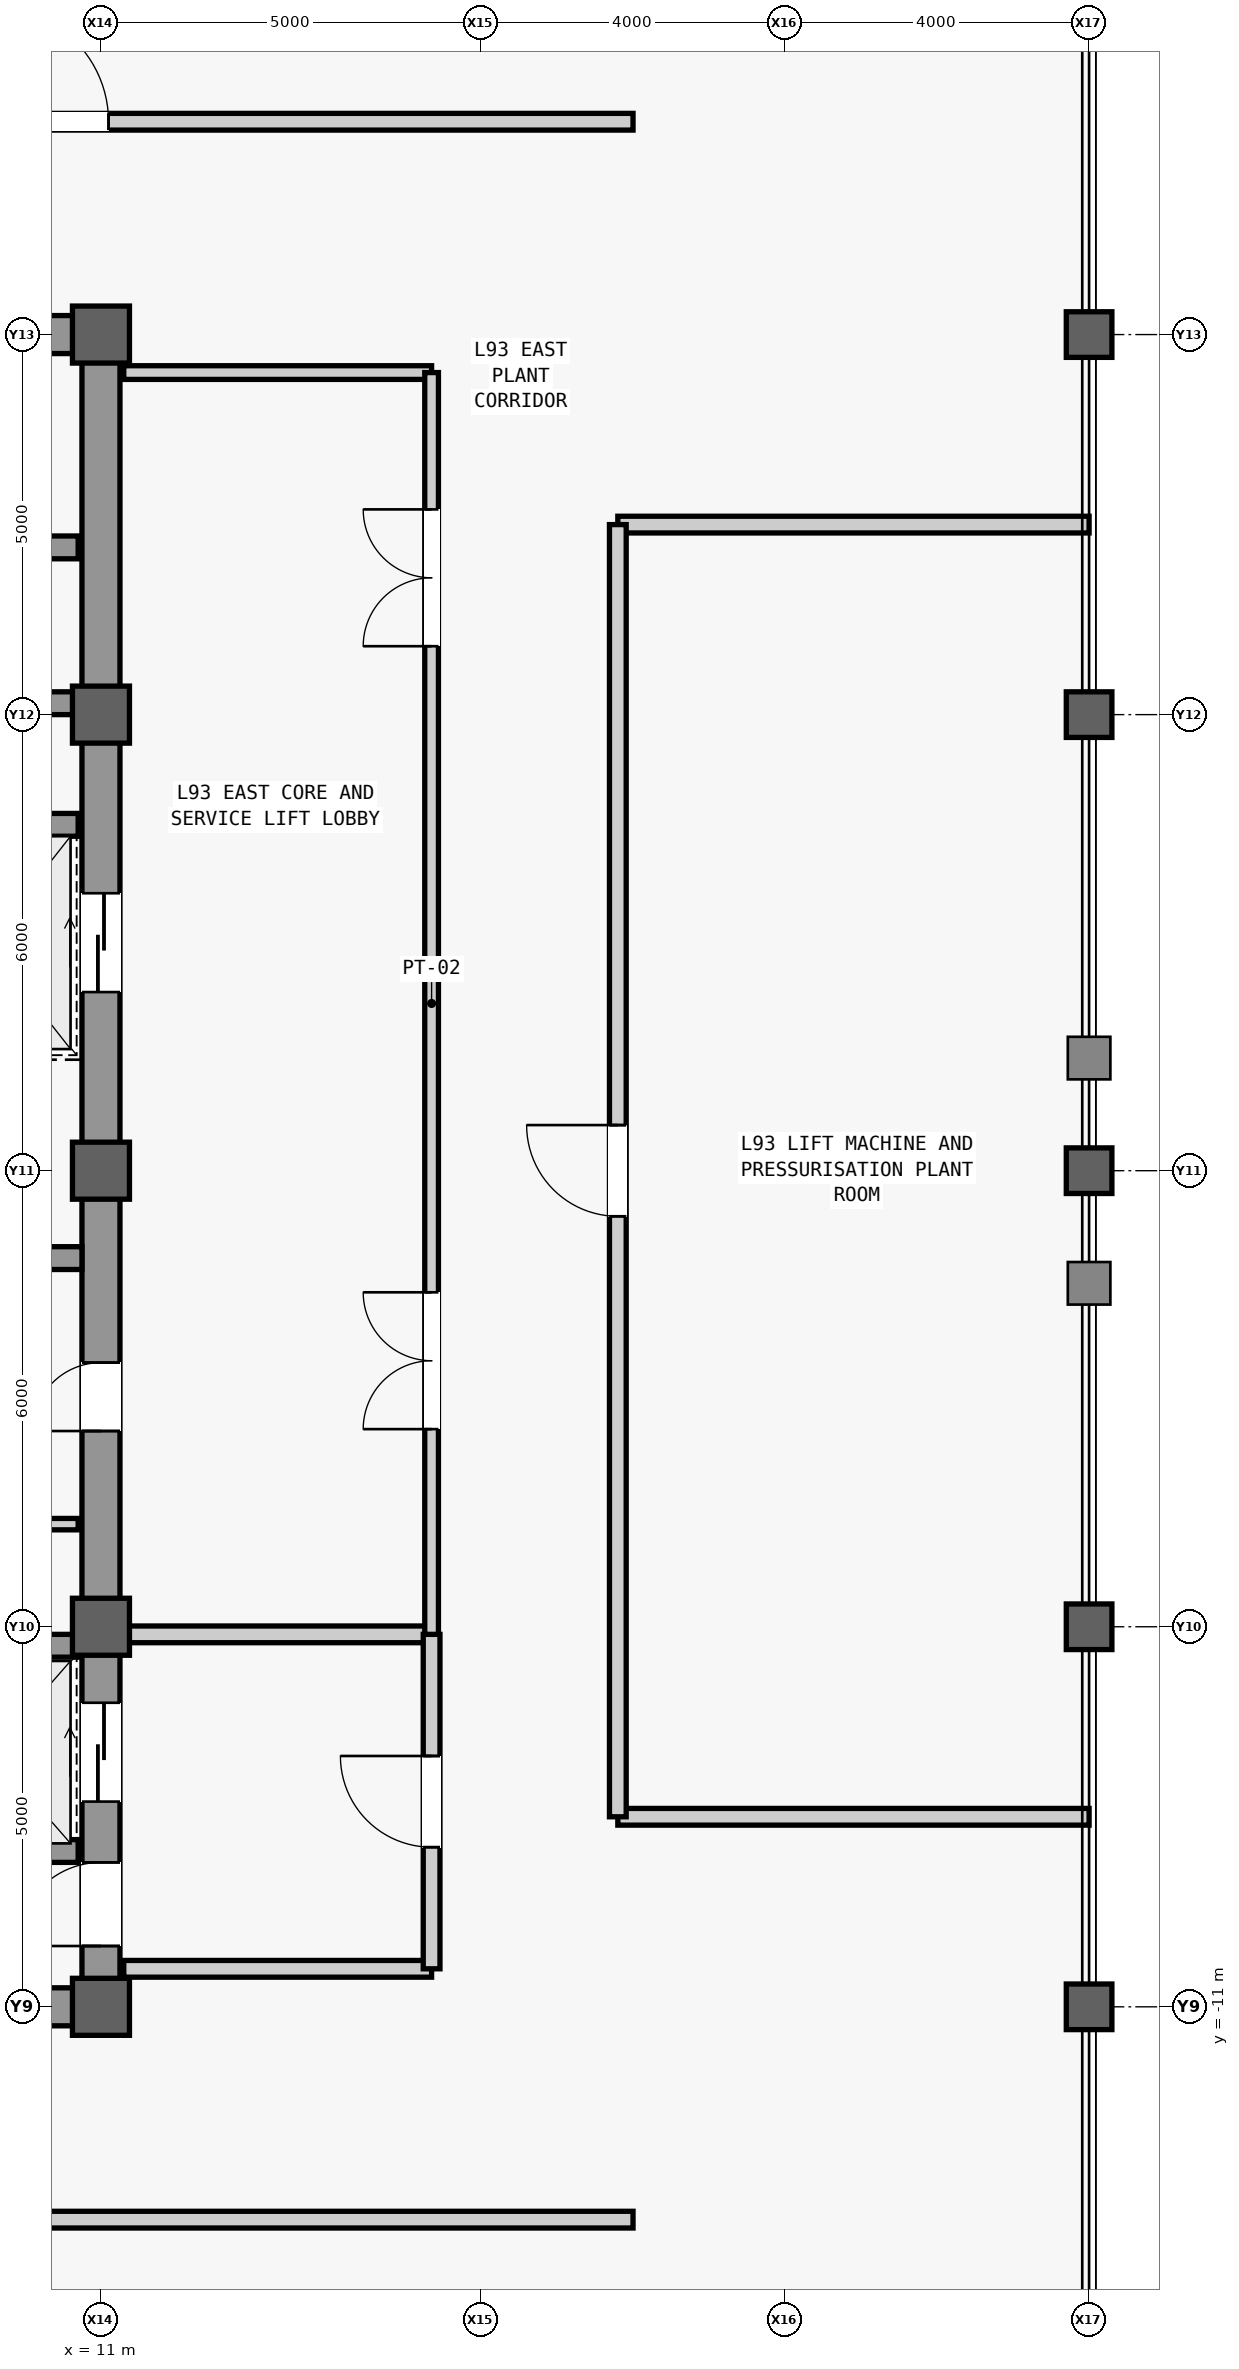
"""IFC4 building model, lengths in metres.
Left out: names, types, materials, properties, quantities, classifications, styles, units other than length and angle.
Written with IfcOpenShell. Run it as: python <this file> out.ifc"""

import sys

from ifc_helpers import new_model, si_unit, direction, frame, frame_2d, origin, origin_2d, place, context, subcontext, project, spatial, rectangle, hollow_rectangle, extrude, source, transform, mapped, element, fill, save


model = new_model("IFC4")
c1 = context("Model", 3, precision=1e-05, world=origin(), true_north=direction((0.0, 1.0)))
c2 = subcontext(c1, "Body", "Model", "MODEL_VIEW")
j1 = project(units=[si_unit("LENGTHUNIT", "METRE"), si_unit("PLANEANGLEUNIT", "RADIAN")], contexts=[c1])
p1 = place(None, origin())
s1 = spatial("IfcSite", under=j1, at=p1, CompositionType="ELEMENT")
p2 = place(p1, origin())
s2 = spatial("IfcBuilding", under=s1, at=p2, CompositionType="ELEMENT")
p3 = place(p2, frame((0.0, 0.0, 394.7)))
s3 = spatial("IfcBuildingStorey", under=s2, at=p3, CompositionType="ELEMENT", Elevation=394.7)
m1 = source(origin(), c2, "Body", "SweptSolid", [
    extrude(rectangle(XDim=22.0, YDim=0.5, at=frame_2d((11.0, 0.0))), origin(), (0.0, 0.0, 1.0), 4.45),
])
p4 = place(p3, frame((11.0, -11.0, 0.0), z_axis=(0.0, 0.0, 1.0), x_axis=(0.0, 1.0, 0.0)))
e1 = element("IfcWall", 1, at=p4, inside=s3, PredefinedType="SHEAR", context=c2, shape_type="MappedRepresentation", body=[
    mapped(m1, transform((0.0, 0.0, 0.0), scale=1.0)),
])
m2 = source(origin(), c2, "Body", "SweptSolid", [
    extrude(rectangle(XDim=1.1, YDim=2.2, at=frame_2d((0.55, 1.1))), frame((0.0, 0.26, 0.0), z_axis=(0.0, -1.0, 0.0), x_axis=(1.0, 0.0, 0.0)), (0.0, 0.0, 1.0), 0.52),
])
p5 = place(p4, frame((0.8, 0.0, 0.0)))
e2 = element("IfcOpeningElement", 2, at=p5, cuts=e1, PredefinedType="OPENING", context=c2, shape_type="MappedRepresentation", body=[
    mapped(m2, transform((0.0, 0.0, 0.0), scale=1.0)),
])
m3 = source(origin(), c2, "Body", "SweptSolid", [
    extrude(rectangle(XDim=0.9, YDim=2.15, at=frame_2d((0.45, 1.075))), frame((0.0, 0.26, 0.0), z_axis=(0.0, -1.0, 0.0), x_axis=(1.0, 0.0, 0.0)), (0.0, 0.0, 1.0), 0.52),
])
p6 = place(p4, frame((7.575, 0.0, 0.0)))
e3 = element("IfcOpeningElement", 3, at=p6, cuts=e1, PredefinedType="OPENING", context=c2, shape_type="MappedRepresentation", body=[
    mapped(m3, transform((0.0, 0.0, 0.0), scale=1.0)),
])
m4 = source(origin(), c2, "Body", "SweptSolid", [
    extrude(rectangle(XDim=1.3, YDim=2.3, at=frame_2d((0.65, 1.15))), frame((0.0, 0.26, 0.0), z_axis=(0.0, -1.0, 0.0), x_axis=(1.0, 0.0, 0.0)), (0.0, 0.0, 1.0), 0.52),
])
p7 = place(p4, frame((2.7, 0.0, 0.0)))
e4 = element("IfcOpeningElement", 4, at=p7, cuts=e1, PredefinedType="OPENING", context=c2, shape_type="MappedRepresentation", body=[
    mapped(m4, transform((0.0, 0.0, 0.0), scale=1.0)),
])
p8 = place(p4, frame((13.35, 0.0, 0.0)))
e5 = element("IfcOpeningElement", 5, at=p8, cuts=e1, PredefinedType="OPENING", context=c2, shape_type="MappedRepresentation", body=[
    mapped(m4, transform((0.0, 0.0, 0.0), scale=1.0)),
])
m5 = source(origin(), c2, "Body", "SweptSolid", [
    extrude(rectangle(XDim=5.9, YDim=0.5, at=frame_2d((2.95, 0.0))), origin(), (0.0, 0.0, 1.0), 4.45),
])
p9 = place(p3, frame((4.85, -11.0, 0.0), z_axis=(0.0, 0.0, 1.0), x_axis=(1.0, 0.0, 0.0)))
e6 = element("IfcWall", 6, at=p9, inside=s3, PredefinedType="SHEAR", context=c2, shape_type="MappedRepresentation", body=[
    mapped(m5, transform((0.0, 0.0, 0.0), scale=1.0)),
])
p10 = place(p3, frame((4.85, 11.0, 0.0), z_axis=(0.0, 0.0, 1.0), x_axis=(1.0, 0.0, 0.0)))
e7 = element("IfcWall", 7, at=p10, inside=s3, PredefinedType="SHEAR", context=c2, shape_type="MappedRepresentation", body=[
    mapped(m5, transform((0.0, 0.0, 0.0), scale=1.0)),
])
p11 = place(p10, frame((0.5, 0.0, 0.0)))
e8 = element("IfcOpeningElement", 8, at=p11, cuts=e7, PredefinedType="OPENING", context=c2, shape_type="MappedRepresentation", body=[
    mapped(m3, transform((0.0, 0.0, 0.0), scale=1.0)),
])
m6 = source(origin(), c2, "Body", "SweptSolid", [
    extrude(rectangle(XDim=5.65, YDim=0.3, at=frame_2d((2.825, 0.0))), origin(), (0.0, 0.0, 1.0), 4.45),
])
p12 = place(p3, frame((5.1, -1.15, 0.0), z_axis=(0.0, 0.0, 1.0), x_axis=(1.0, 0.0, 0.0)))
e9 = element("IfcWall", 9, at=p12, inside=s3, PredefinedType="SHEAR", context=c2, shape_type="MappedRepresentation", body=[
    mapped(m6, transform((0.0, 0.0, 0.0), scale=1.0)),
])
m7 = source(origin(), c2, "Body", "SweptSolid", [
    extrude(rectangle(XDim=0.75, YDim=0.75, at=origin_2d()), origin(), (0.0, 0.0, 1.0), 4.8),
])
for number, where, z_axis, x_axis in (
    (10, (11.0, -11.0, 0.0), (0.0, 0.0, 1.0), (1.0, 0.0, 0.0)),
    (11, (11.0, -6.0, 0.0), (0.0, 0.0, 1.0), (1.0, 0.0, 0.0)),
    (12, (11.0, 0.0, 0.0), (0.0, 0.0, 1.0), (1.0, 0.0, 0.0)),
    (13, (11.0, 6.0, 0.0), (0.0, 0.0, 1.0), (1.0, 0.0, 0.0)),
    (14, (11.0, 11.0, 0.0), (0.0, 0.0, 1.0), (1.0, 0.0, 0.0)),
):
    element("IfcColumn", number, at=place(p3, frame(where, z_axis=z_axis, x_axis=x_axis)), inside=s3, PredefinedType="COLUMN", context=c2, shape_type="MappedRepresentation", body=[
        mapped(m7, transform((0.0, 0.0, 0.0), scale=1.0)),
    ])
m8 = source(origin(), c2, "Body", "SweptSolid", [
    extrude(hollow_rectangle(XDim=0.6, YDim=0.6, WallThickness=0.035, at=origin_2d()), origin(), (0.0, 0.0, 1.0), 4.8),
])
for number, where, z_axis, x_axis in (
    (15, (24.0, -11.0, 0.0), (0.0, 0.0, 1.0), (1.0, 0.0, 0.0)),
    (16, (24.0, -6.0, 0.0), (0.0, 0.0, 1.0), (1.0, 0.0, 0.0)),
    (17, (24.0, 0.0, 0.0), (0.0, 0.0, 1.0), (1.0, 0.0, 0.0)),
    (18, (24.0, 6.0, 0.0), (0.0, 0.0, 1.0), (1.0, 0.0, 0.0)),
    (19, (24.0, 11.0, 0.0), (0.0, 0.0, 1.0), (1.0, 0.0, 0.0)),
):
    element("IfcColumn", number, at=place(p3, frame(where, z_axis=z_axis, x_axis=x_axis)), inside=s3, PredefinedType="COLUMN", context=c2, shape_type="MappedRepresentation", body=[
        mapped(m8, transform((0.0, 0.0, 0.0), scale=1.0)),
    ])
m9 = source(origin(), c2, "Body", "SweptSolid", [
    extrude(rectangle(XDim=2.2, YDim=0.3, at=frame_2d((1.1, 0.0))), origin(), (0.0, 0.0, 1.0), 4.45),
])
for number, where, z_axis, x_axis in (
    (20, (8.5, -8.95, 0.0), (0.0, 0.0, 1.0), (1.0, 0.0, 0.0)),
    (21, (8.5, -6.25, 0.0), (0.0, 0.0, 1.0), (1.0, 0.0, 0.0)),
):
    element("IfcWall", number, at=place(p3, frame(where, z_axis=z_axis, x_axis=x_axis)), inside=s3, PredefinedType="SHEAR", context=c2, shape_type="MappedRepresentation", body=[
        mapped(m9, transform((0.0, 0.0, 0.0), scale=1.0)),
    ])
m10 = source(origin(), c2, "Body", "SweptSolid", [
    extrude(rectangle(XDim=2.3, YDim=0.3, at=frame_2d((1.15, 0.0))), origin(), (0.0, 0.0, 1.0), 4.45),
])
for number, where, z_axis, x_axis in (
    (22, (8.4, 4.55, 0.0), (0.0, 0.0, 1.0), (1.0, 0.0, 0.0)),
    (23, (8.4, 6.15, 0.0), (0.0, 0.0, 1.0), (1.0, 0.0, 0.0)),
    (24, (8.4, 8.2, 0.0), (0.0, 0.0, 1.0), (1.0, 0.0, 0.0)),
):
    element("IfcWall", number, at=place(p3, frame(where, z_axis=z_axis, x_axis=x_axis)), inside=s3, PredefinedType="SHEAR", context=c2, shape_type="MappedRepresentation", body=[
        mapped(m10, transform((0.0, 0.0, 0.0), scale=1.0)),
    ])
m11 = source(origin(), c2, "Body", "SweptSolid", [
    extrude(rectangle(XDim=2.05, YDim=0.15, at=frame_2d((1.025, 0.0))), origin(), (0.0, 0.0, 1.0), 4.45),
])
p13 = place(p3, frame((8.65, -4.65, 0.0), z_axis=(0.0, 0.0, 1.0), x_axis=(1.0, 0.0, 0.0)))
e25 = element("IfcWall", 25, at=p13, inside=s3, PredefinedType="PARTITIONING", context=c2, shape_type="MappedRepresentation", body=[
    mapped(m11, transform((0.0, 0.0, 0.0), scale=1.0)),
])
m12 = source(origin(), c2, "Body", "SweptSolid", [
    extrude(rectangle(XDim=4.05, YDim=0.22, at=frame_2d((2.025, 0.0))), origin(), (0.0, 0.0, 1.0), 4.45),
])
p14 = place(p3, frame((11.3, -10.5, 0.0), z_axis=(0.0, 0.0, 1.0), x_axis=(1.0, 0.0, 0.0)))
e26 = element("IfcWall", 26, at=p14, inside=s3, PredefinedType="PARTITIONING", context=c2, shape_type="MappedRepresentation", body=[
    mapped(m12, transform((0.0, 0.0, 0.0), scale=1.0)),
])
m13 = source(origin(), c2, "Body", "SweptSolid", [
    extrude(rectangle(XDim=4.05, YDim=0.22, at=frame_2d((2.025, 0.0))), origin(), (0.0, 0.0, 1.0), 3.901),
])
p15 = place(p3, frame((11.3, -6.1, 0.0), z_axis=(0.0, 0.0, 1.0), x_axis=(1.0, 0.0, 0.0)))
e27 = element("IfcWall", 27, at=p15, inside=s3, PredefinedType="PARTITIONING", context=c2, shape_type="MappedRepresentation", body=[
    mapped(m13, transform((0.0, 0.0, 0.0), scale=1.0)),
])
m14 = source(origin(), c2, "Body", "SweptSolid", [
    extrude(rectangle(XDim=4.4, YDim=0.22, at=frame_2d((2.2, 0.0))), origin(), (0.0, 0.0, 1.0), 4.45),
])
p16 = place(p3, frame((15.35, -10.5, 0.0), z_axis=(0.0, 0.0, 1.0), x_axis=(0.0, 1.0, 0.0)))
e28 = element("IfcWall", 28, at=p16, inside=s3, PredefinedType="PARTITIONING", context=c2, shape_type="MappedRepresentation", body=[
    mapped(m14, transform((0.0, 0.0, 0.0), scale=1.0)),
])
m15 = source(origin(), c2, "Body", "SweptSolid", [
    extrude(rectangle(XDim=1.2, YDim=2.2, at=frame_2d((0.6, 1.1))), frame((0.0, 0.12, 0.0), z_axis=(0.0, -1.0, 0.0), x_axis=(1.0, 0.0, 0.0)), (0.0, 0.0, 1.0), 0.24),
])
p17 = place(p16, frame((1.6, 0.0, 0.0)))
e29 = element("IfcOpeningElement", 29, at=p17, cuts=e28, PredefinedType="OPENING", context=c2, shape_type="MappedRepresentation", body=[
    mapped(m15, transform((0.0, 0.0, 0.0), scale=1.0)),
])
m16 = source(origin(), c2, "Body", "SweptSolid", [
    extrude(rectangle(XDim=4.05, YDim=0.18, at=frame_2d((2.025, 0.0))), origin(), (0.0, 0.0, 1.0), 4.45),
])
p18 = place(p3, frame((11.3, 10.5, 0.0), z_axis=(0.0, 0.0, 1.0), x_axis=(1.0, 0.0, 0.0)))
e30 = element("IfcWall", 30, at=p18, inside=s3, PredefinedType="PARTITIONING", context=c2, shape_type="MappedRepresentation", body=[
    mapped(m16, transform((0.0, 0.0, 0.0), scale=1.0)),
])
m17 = source(origin(), c2, "Body", "SweptSolid", [
    extrude(rectangle(XDim=16.6, YDim=0.18, at=frame_2d((8.3, 0.0))), origin(), (0.0, 0.0, 1.0), 4.45),
])
p19 = place(p3, frame((15.35, -6.1, 0.0), z_axis=(0.0, 0.0, 1.0), x_axis=(0.0, 1.0, 0.0)))
e31 = element("IfcWall", 31, at=p19, inside=s3, PredefinedType="PARTITIONING", context=c2, shape_type="MappedRepresentation", body=[
    mapped(m17, transform((0.0, 0.0, 0.0), scale=1.0)),
])
m18 = source(origin(), c2, "Body", "SweptSolid", [
    extrude(rectangle(XDim=1.8, YDim=2.25, at=frame_2d((0.9, 1.125))), frame((0.0, 0.1, 0.0), z_axis=(0.0, -1.0, 0.0), x_axis=(1.0, 0.0, 0.0)), (0.0, 0.0, 1.0), 0.2),
])
p20 = place(p19, frame((2.7, 0.0, 0.0)))
e32 = element("IfcOpeningElement", 32, at=p20, cuts=e31, PredefinedType="OPENING", context=c2, shape_type="MappedRepresentation", body=[
    mapped(m18, transform((0.0, 0.0, 0.0), scale=1.0)),
])
p21 = place(p19, frame((13.0, 0.0, 0.0)))
e33 = element("IfcOpeningElement", 33, at=p21, cuts=e31, PredefinedType="OPENING", context=c2, shape_type="MappedRepresentation", body=[
    mapped(m18, transform((0.0, 0.0, 0.0), scale=1.0)),
])
m19 = source(origin(), c2, "Body", "SweptSolid", [
    extrude(rectangle(XDim=36.0, YDim=0.22, at=frame_2d((18.0, 0.0))), origin(), (0.0, 0.0, 1.0), 4.45),
])
p22 = place(p3, frame((-18.0, -13.8, 0.0), z_axis=(0.0, 0.0, 1.0), x_axis=(1.0, 0.0, 0.0)))
e34 = element("IfcWall", 34, at=p22, inside=s3, PredefinedType="PARTITIONING", context=c2, shape_type="MappedRepresentation", body=[
    mapped(m19, transform((0.0, 0.0, 0.0), scale=1.0)),
])
m20 = source(origin(), c2, "Body", "SweptSolid", [
    extrude(rectangle(XDim=1.5, YDim=2.3, at=frame_2d((0.75, 1.15))), frame((0.0, 0.12, 0.0), z_axis=(0.0, -1.0, 0.0), x_axis=(1.0, 0.0, 0.0)), (0.0, 0.0, 1.0), 0.24),
])
p23 = place(p22, frame((12.4, 0.0, 0.0)))
e35 = element("IfcOpeningElement", 35, at=p23, cuts=e34, PredefinedType="OPENING", context=c2, shape_type="MappedRepresentation", body=[
    mapped(m20, transform((0.0, 0.0, 0.0), scale=1.0)),
])
p24 = place(p22, frame((25.4, 0.0, 0.0)))
e36 = element("IfcOpeningElement", 36, at=p24, cuts=e34, PredefinedType="OPENING", context=c2, shape_type="MappedRepresentation", body=[
    mapped(m20, transform((0.0, 0.0, 0.0), scale=1.0)),
])
p25 = place(p3, frame((-18.0, 13.8, 0.0), z_axis=(0.0, 0.0, 1.0), x_axis=(1.0, 0.0, 0.0)))
e37 = element("IfcWall", 37, at=p25, inside=s3, PredefinedType="PARTITIONING", context=c2, shape_type="MappedRepresentation", body=[
    mapped(m19, transform((0.0, 0.0, 0.0), scale=1.0)),
])
p26 = place(p25, frame((9.45, 0.0, 0.0)))
e38 = element("IfcOpeningElement", 38, at=p26, cuts=e37, PredefinedType="OPENING", context=c2, shape_type="MappedRepresentation", body=[
    mapped(m20, transform((0.0, 0.0, 0.0), scale=1.0)),
])
p27 = place(p25, frame((19.15, 0.0, 0.0)))
e39 = element("IfcOpeningElement", 39, at=p27, cuts=e37, PredefinedType="OPENING", context=c2, shape_type="MappedRepresentation", body=[
    mapped(m20, transform((0.0, 0.0, 0.0), scale=1.0)),
])
p28 = place(p25, frame((27.6, 0.0, 0.0)))
e40 = element("IfcOpeningElement", 40, at=p28, cuts=e37, PredefinedType="OPENING", context=c2, shape_type="MappedRepresentation", body=[
    mapped(m20, transform((0.0, 0.0, 0.0), scale=1.0)),
])
m21 = source(origin(), c2, "Body", "SweptSolid", [
    extrude(rectangle(XDim=6.2, YDim=0.22, at=frame_2d((3.1, 0.0))), origin(), (0.0, 0.0, 1.0), 4.45),
])
for number, where, z_axis, x_axis in (
    (41, (17.8, -8.5, 0.0), (0.0, 0.0, 1.0), (1.0, 0.0, 0.0)),
    (42, (17.8, 8.5, 0.0), (0.0, 0.0, 1.0), (1.0, 0.0, 0.0)),
):
    element("IfcWall", number, at=place(p3, frame(where, z_axis=z_axis, x_axis=x_axis)), inside=s3, PredefinedType="PARTITIONING", context=c2, shape_type="MappedRepresentation", body=[
        mapped(m21, transform((0.0, 0.0, 0.0), scale=1.0)),
    ])
m22 = source(origin(), c2, "Body", "SweptSolid", [
    extrude(rectangle(XDim=17.0, YDim=0.22, at=frame_2d((8.5, 0.0))), origin(), (0.0, 0.0, 1.0), 4.45),
])
p29 = place(p3, frame((17.8, -8.5, 0.0), z_axis=(0.0, 0.0, 1.0), x_axis=(0.0, 1.0, 0.0)))
e43 = element("IfcWall", 43, at=p29, inside=s3, PredefinedType="PARTITIONING", context=c2, shape_type="MappedRepresentation", body=[
    mapped(m22, transform((0.0, 0.0, 0.0), scale=1.0)),
])
p30 = place(p29, frame((7.9, 0.0, 0.0)))
e44 = element("IfcOpeningElement", 44, at=p30, cuts=e43, PredefinedType="OPENING", context=c2, shape_type="MappedRepresentation", body=[
    mapped(m15, transform((0.0, 0.0, 0.0), scale=1.0)),
])
m23 = source(origin(), c2, "Body", "SweptSolid", [
    extrude(rectangle(XDim=1.1, YDim=2.2, at=frame_2d((0.55, 1.1))), frame((0.0, 0.025, 0.0), z_axis=(0.0, -1.0, 0.0), x_axis=(1.0, 0.0, 0.0)), (0.0, 0.0, 1.0), 0.05),
])
p31 = place(p5, origin())
e45 = element("IfcDoor", 45, at=p31, inside=s3, OperationType="SINGLE_SWING_LEFT", PredefinedType="DOOR", context=c2, shape_type="MappedRepresentation", body=[
    mapped(m23, transform((0.0, 0.0, 0.0), scale=1.0)),
])
fill(e2, e45)
m24 = source(origin(), c2, "Body", "SweptSolid", [
    extrude(rectangle(XDim=0.9, YDim=2.15, at=frame_2d((0.45, 1.075))), frame((0.0, 0.025, 0.0), z_axis=(0.0, -1.0, 0.0), x_axis=(1.0, 0.0, 0.0)), (0.0, 0.0, 1.0), 0.05),
])
p32 = place(p6, origin())
e46 = element("IfcDoor", 46, at=p32, inside=s3, OperationType="SINGLE_SWING_LEFT", PredefinedType="DOOR", context=c2, shape_type="MappedRepresentation", body=[
    mapped(m24, transform((0.0, 0.0, 0.0), scale=1.0)),
])
fill(e3, e46)
m25 = source(origin(), c2, "Body", "SweptSolid", [
    extrude(rectangle(XDim=1.2, YDim=2.2, at=frame_2d((0.6, 1.1))), frame((0.0, 0.025, 0.0), z_axis=(0.0, -1.0, 0.0), x_axis=(1.0, 0.0, 0.0)), (0.0, 0.0, 1.0), 0.05),
])
p33 = place(p17, origin())
e47 = element("IfcDoor", 47, at=p33, inside=s3, OperationType="SINGLE_SWING_RIGHT", PredefinedType="DOOR", context=c2, shape_type="MappedRepresentation", body=[
    mapped(m25, transform((0.0, 0.0, 0.0), scale=1.0)),
])
fill(e29, e47)
m26 = source(origin(), c2, "Body", "SweptSolid", [
    extrude(rectangle(XDim=1.8, YDim=2.25, at=frame_2d((0.9, 1.125))), frame((0.0, 0.025, 0.0), z_axis=(0.0, -1.0, 0.0), x_axis=(1.0, 0.0, 0.0)), (0.0, 0.0, 1.0), 0.05),
])
p34 = place(p20, origin())
e48 = element("IfcDoor", 48, at=p34, inside=s3, OperationType="SINGLE_SWING_RIGHT", PredefinedType="DOOR", context=c2, shape_type="MappedRepresentation", body=[
    mapped(m26, transform((0.0, 0.0, 0.0), scale=1.0)),
])
fill(e32, e48)
p35 = place(p21, origin())
e49 = element("IfcDoor", 49, at=p35, inside=s3, OperationType="SINGLE_SWING_LEFT", PredefinedType="DOOR", context=c2, shape_type="MappedRepresentation", body=[
    mapped(m26, transform((0.0, 0.0, 0.0), scale=1.0)),
])
fill(e33, e49)
m27 = source(origin(), c2, "Body", "SweptSolid", [
    extrude(rectangle(XDim=1.5, YDim=2.3, at=frame_2d((0.75, 1.15))), frame((0.0, 0.025, 0.0), z_axis=(0.0, -1.0, 0.0), x_axis=(1.0, 0.0, 0.0)), (0.0, 0.0, 1.0), 0.05),
])
p36 = place(p28, origin())
e50 = element("IfcDoor", 50, at=p36, inside=s3, OperationType="SINGLE_SWING_LEFT", PredefinedType="DOOR", context=c2, shape_type="MappedRepresentation", body=[
    mapped(m27, transform((0.0, 0.0, 0.0), scale=1.0)),
])
fill(e40, e50)
p37 = place(p30, origin())
e51 = element("IfcDoor", 51, at=p37, inside=s3, OperationType="SINGLE_SWING_RIGHT", PredefinedType="DOOR", context=c2, shape_type="MappedRepresentation", body=[
    mapped(m25, transform((0.0, 0.0, 0.0), scale=1.0)),
])
fill(e44, e51)
m28 = source(origin(), c2, "Body", "SweptSolid", [
    extrude(rectangle(XDim=1.3, YDim=2.3, at=frame_2d((0.65, 1.15))), frame((0.0, 0.025, 0.0), z_axis=(0.0, -1.0, 0.0), x_axis=(1.0, 0.0, 0.0)), (0.0, 0.0, 1.0), 0.05),
])
p38 = place(p7, origin())
e52 = element("IfcDoor", 52, at=p38, inside=s3, OperationType="SLIDING_TO_LEFT", PredefinedType="DOOR", context=c2, shape_type="MappedRepresentation", body=[
    mapped(m28, transform((0.0, 0.0, 0.0), scale=1.0)),
])
fill(e4, e52)
p39 = place(p8, origin())
e53 = element("IfcDoor", 53, at=p39, inside=s3, OperationType="SLIDING_TO_LEFT", PredefinedType="DOOR", context=c2, shape_type="MappedRepresentation", body=[
    mapped(m28, transform((0.0, 0.0, 0.0), scale=1.0)),
])
fill(e5, e53)
save(model, sys.argv[1])
